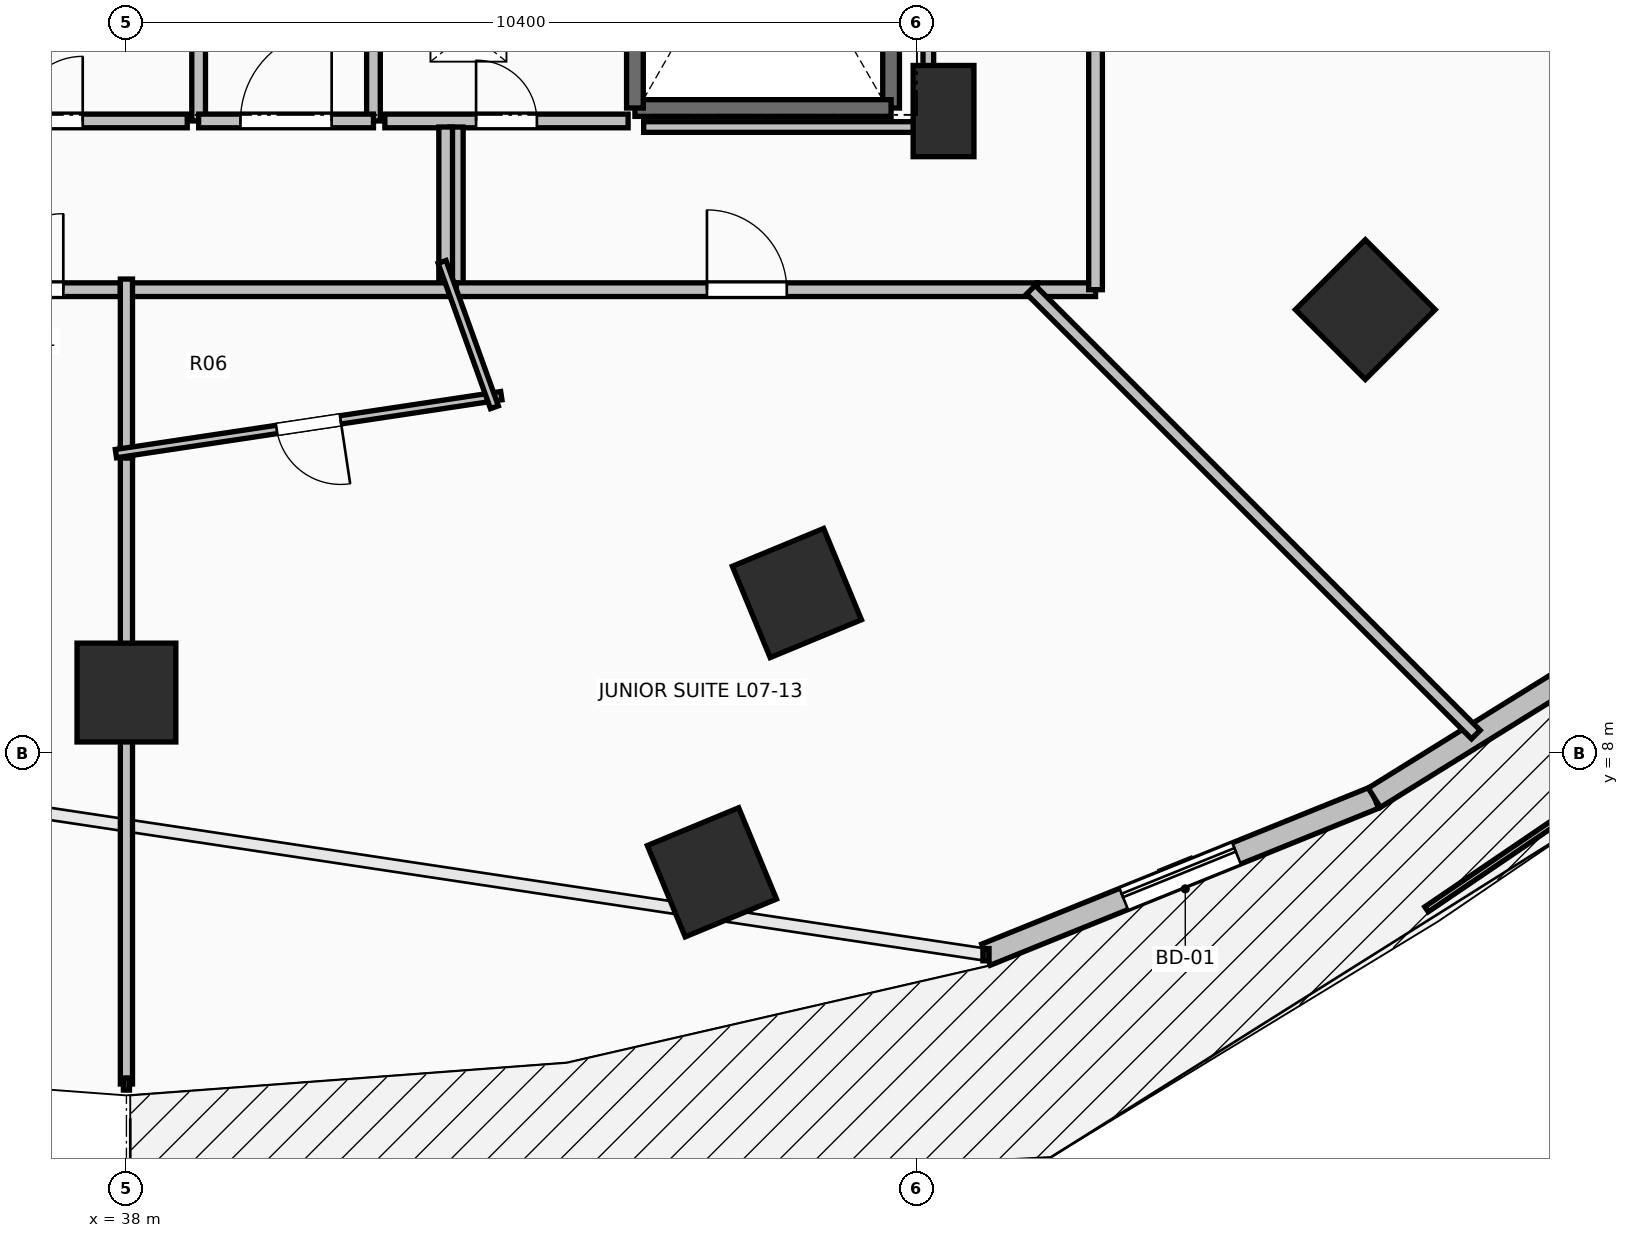
"""IFC4 building model, lengths in metres.
Left out: names, types, materials, properties, quantities, classifications, styles, units other than length and angle.
Written with IfcOpenShell. Run it as: python <this file> out.ifc"""

import sys

from ifc_helpers import new_model, si_unit, direction, frame, frame_2d, origin, origin_2d, place, context, subcontext, project, spatial, rectangle, extrude, element, fill, save


model = new_model("IFC4")
c1 = context("Model", 3, precision=1e-05, world=origin(), true_north=direction((0.0, 1.0)))
c2 = subcontext(c1, "Body", "Model", "MODEL_VIEW")
j1 = project(units=[si_unit("LENGTHUNIT", "METRE"), si_unit("PLANEANGLEUNIT", "RADIAN")], contexts=[c1])
p1 = place(None, origin())
s1 = spatial("IfcSite", under=j1, at=p1, CompositionType="ELEMENT")
p2 = place(p1, origin())
s2 = spatial("IfcBuilding", under=s1, at=p2, CompositionType="ELEMENT")
p3 = place(p2, frame((0.0, 0.0, 31.0)))
s3 = spatial("IfcBuildingStorey", under=s2, at=p3, CompositionType="ELEMENT", Elevation=31.0)
for number, where, z_axis, x_axis in (
    (1, (38.0, 8.8, 0.0), (0.0, 0.0, 1.0), (0.0, -1.0, 0.0)),
    (2, (46.821, 10.109, 0.0), (0.0, 0.0, 1.0), (0.383, -0.924, 0.0)),
    (3, (54.299, 13.838, 0.0), (0.0, 0.0, 1.0), (0.707, -0.707, 0.0)),
    (4, (45.703, 6.435, 0.0), (0.0, 0.0, 1.0), (0.383, -0.924, 0.0)),
):
    element("IfcColumn", number, at=place(p3, frame(where, z_axis=z_axis, x_axis=x_axis)), inside=s3, PredefinedType="COLUMN", context=c2, shape_type="SweptSolid", body=[
        extrude(rectangle(XDim=1.3, YDim=1.3, at=origin_2d()), origin(), (0.0, 0.0, 1.0), 3.5),
    ])
p4 = place(p3, frame((48.75, 16.45, 0.0), z_axis=(0.0, 0.0, 1.0), x_axis=(1.0, 0.0, 0.0)))
e5 = element("IfcColumn", 5, at=p4, inside=s3, PredefinedType="PILASTER", context=c2, shape_type="SweptSolid", body=[
    extrude(rectangle(XDim=0.8, YDim=1.2, at=origin_2d()), origin(), (0.0, 0.0, 1.0), 3.5),
])
p5 = place(p3, frame((49.308, 5.351, 0.0), z_axis=(0.0, 0.0, 1.0), x_axis=(0.927095325176, 0.374825636845, 0.0)))
e6 = element("IfcWall", 6, at=p5, inside=s3, PredefinedType="STANDARD", context=c2, shape_type="SweptSolid", body=[
    extrude(rectangle(XDim=5.51, YDim=0.3, at=frame_2d((2.755, 0.0))), origin(), (0.0, 0.0, 1.0), 3.24),
])
p6 = place(p5, frame((1.955, 0.0, 0.0)))
e7 = element("IfcOpeningElement", 7, at=p6, cuts=e6, PredefinedType="OPENING", context=c2, shape_type="SweptSolid", body=[
    extrude(rectangle(XDim=1.6, YDim=2.3, at=frame_2d((0.8, 1.15))), frame((0.0, 0.165, 0.0), z_axis=(0.0, -1.0, 0.0), x_axis=(1.0, 0.0, 0.0)), (0.0, 0.0, 1.0), 0.33),
])
p7 = place(p3, frame((54.417, 7.417, 0.0), z_axis=(0.0, 0.0, 1.0), x_axis=(0.849633724826, 0.527373239404, 0.0)))
e8 = element("IfcWall", 8, at=p7, inside=s3, PredefinedType="STANDARD", context=c2, shape_type="SweptSolid", body=[
    extrude(rectangle(XDim=5.271, YDim=0.3, at=frame_2d((2.635, 0.0))), origin(), (0.0, 0.0, 1.0), 3.24),
])
p8 = place(p3, frame((48.06, 23.91, 0.0), z_axis=(0.0, 0.0, 1.0), x_axis=(0.0, -1.0, 0.0)))
e9 = element("IfcWall", 9, at=p8, inside=s3, PredefinedType="SOLIDWALL", context=c2, shape_type="SweptSolid", body=[
    extrude(rectangle(XDim=7.42, YDim=0.22, at=frame_2d((3.71, 0.0))), origin(), (0.0, 0.0, 1.0), 3.24),
])
p9 = place(p3, frame((48.06, 16.49, 0.0), z_axis=(0.0, 0.0, 1.0), x_axis=(-1.0, 0.0, 0.0)))
e10 = element("IfcWall", 10, at=p9, inside=s3, PredefinedType="SOLIDWALL", context=c2, shape_type="SweptSolid", body=[
    extrude(rectangle(XDim=3.37, YDim=0.22, at=frame_2d((1.685, 0.0))), origin(), (0.0, 0.0, 1.0), 3.24),
])
p10 = place(p3, frame((44.69, 16.49, 0.0), z_axis=(0.0, 0.0, 1.0), x_axis=(0.0, 1.0, 0.0)))
e11 = element("IfcWall", 11, at=p10, inside=s3, PredefinedType="SOLIDWALL", context=c2, shape_type="SweptSolid", body=[
    extrude(rectangle(XDim=7.42, YDim=0.22, at=frame_2d((3.71, 0.0))), origin(), (0.0, 0.0, 1.0), 3.24),
])
p11 = place(p3, frame((41.25, 16.32, 0.0), z_axis=(0.0, 0.0, 1.0), x_axis=(0.0, 1.0, 0.0)))
e12 = element("IfcWall", 12, at=p11, inside=s3, PredefinedType="PARTITIONING", context=c2, shape_type="SweptSolid", body=[
    extrude(rectangle(XDim=7.88, YDim=0.18, at=frame_2d((3.94, 0.0))), origin(), (0.0, 0.0, 1.0), 3.24),
])
p12 = place(p11, frame((3.54, 0.0, 0.0)))
e13 = element("IfcOpeningElement", 13, at=p12, cuts=e12, PredefinedType="OPENING", context=c2, shape_type="SweptSolid", body=[
    extrude(rectangle(XDim=0.8, YDim=2.05, at=frame_2d((0.4, 1.025))), frame((0.0, 0.105, 0.0), z_axis=(0.0, -1.0, 0.0), x_axis=(1.0, 0.0, 0.0)), (0.0, 0.0, 1.0), 0.21),
])
p13 = place(p3, frame((38.95, 21.755, 0.0), z_axis=(0.0, 0.0, 1.0), x_axis=(0.0, -1.0, 0.0)))
e14 = element("IfcWall", 14, at=p13, inside=s3, PredefinedType="PARTITIONING", context=c2, shape_type="SweptSolid", body=[
    extrude(rectangle(XDim=5.435, YDim=0.18, at=frame_2d((2.717, 0.0))), origin(), (0.0, 0.0, 1.0), 3.24),
])
p14 = place(p13, frame((2.292, 0.0, 0.0)))
e15 = element("IfcOpeningElement", 15, at=p14, cuts=e14, PredefinedType="OPENING", context=c2, shape_type="SweptSolid", body=[
    extrude(rectangle(XDim=0.85, YDim=2.1, at=frame_2d((0.425, 1.05))), frame((0.0, 0.105, 0.0), z_axis=(0.0, -1.0, 0.0), x_axis=(1.0, 0.0, 0.0)), (0.0, 0.0, 1.0), 0.21),
])
p15 = place(p3, frame((38.95, 16.32, 0.0), z_axis=(0.0, 0.0, 1.0), x_axis=(1.0, 0.0, 0.0)))
e16 = element("IfcWall", 16, at=p15, inside=s3, PredefinedType="PARTITIONING", context=c2, shape_type="SweptSolid", body=[
    extrude(rectangle(XDim=2.3, YDim=0.18, at=frame_2d((1.15, 0.0))), origin(), (0.0, 0.0, 1.0), 3.24),
])
p16 = place(p15, frame((0.55, 0.0, 0.0)))
e17 = element("IfcOpeningElement", 17, at=p16, cuts=e16, PredefinedType="OPENING", context=c2, shape_type="SweptSolid", body=[
    extrude(rectangle(XDim=1.2, YDim=2.15, at=frame_2d((0.6, 1.075))), frame((0.0, 0.105, 0.0), z_axis=(0.0, -1.0, 0.0), x_axis=(1.0, 0.0, 0.0)), (0.0, 0.0, 1.0), 0.21),
])
p17 = place(p3, frame((41.4, 16.32, 0.0), z_axis=(0.0, 0.0, 1.0), x_axis=(1.0, 0.0, 0.0)))
e18 = element("IfcWall", 18, at=p17, inside=s3, PredefinedType="PARTITIONING", context=c2, shape_type="SweptSolid", body=[
    extrude(rectangle(XDim=3.2, YDim=0.18, at=frame_2d((1.6, 0.0))), origin(), (0.0, 0.0, 1.0), 3.24),
])
p18 = place(p17, frame((1.2, 0.0, 0.0)))
e19 = element("IfcOpeningElement", 19, at=p18, cuts=e18, PredefinedType="OPENING", context=c2, shape_type="SweptSolid", body=[
    extrude(rectangle(XDim=0.8, YDim=2.05, at=frame_2d((0.4, 1.025))), frame((0.0, 0.105, 0.0), z_axis=(0.0, -1.0, 0.0), x_axis=(1.0, 0.0, 0.0)), (0.0, 0.0, 1.0), 0.21),
])
p19 = place(p3, frame((35.2, 16.32, 0.0), z_axis=(0.0, 0.0, 1.0), x_axis=(1.0, 0.0, 0.0)))
e20 = element("IfcWall", 20, at=p19, inside=s3, PredefinedType="PARTITIONING", context=c2, shape_type="SweptSolid", body=[
    extrude(rectangle(XDim=3.6, YDim=0.18, at=frame_2d((1.8, 0.0))), origin(), (0.0, 0.0, 1.0), 3.24),
])
p20 = place(p19, frame((1.375, 0.0, 0.0)))
e21 = element("IfcOpeningElement", 21, at=p20, cuts=e20, PredefinedType="OPENING", context=c2, shape_type="SweptSolid", body=[
    extrude(rectangle(XDim=0.85, YDim=2.1, at=frame_2d((0.425, 1.05))), frame((0.0, 0.105, 0.0), z_axis=(0.0, -1.0, 0.0), x_axis=(1.0, 0.0, 0.0)), (0.0, 0.0, 1.0), 0.21),
])
p21 = place(p3, frame((35.279, 14.1, 0.0), z_axis=(0.0, 0.0, 1.0), x_axis=(1.0, 0.0, 0.0)))
e22 = element("IfcWall", 22, at=p21, inside=s3, PredefinedType="PARTITIONING", context=c2, shape_type="SweptSolid", body=[
    extrude(rectangle(XDim=2.781, YDim=0.18, at=frame_2d((1.391, 0.0))), origin(), (0.0, 0.0, 1.0), 3.24),
])
p22 = place(p21, frame((0.89, 0.0, 0.0)))
e23 = element("IfcOpeningElement", 23, at=p22, cuts=e22, PredefinedType="OPENING", context=c2, shape_type="SweptSolid", body=[
    extrude(rectangle(XDim=1.0, YDim=2.15, at=frame_2d((0.5, 1.075))), frame((0.0, 0.105, 0.0), z_axis=(0.0, -1.0, 0.0), x_axis=(1.0, 0.0, 0.0)), (0.0, 0.0, 1.0), 0.21),
])
p23 = place(p3, frame((42.34, 16.24, 0.0), z_axis=(0.0, 0.0, 1.0), x_axis=(0.0, -1.0, 0.0)))
e24 = element("IfcWall", 24, at=p23, inside=s3, PredefinedType="PARTITIONING", context=c2, shape_type="SweptSolid", body=[
    extrude(rectangle(XDim=2.14, YDim=0.18, at=frame_2d((1.07, 0.0))), origin(), (0.0, 0.0, 1.0), 3.24),
])
p24 = place(p3, frame((42.34, 14.1, 0.0), z_axis=(0.0, 0.0, 1.0), x_axis=(1.0, 0.0, 0.0)))
e25 = element("IfcWall", 25, at=p24, inside=s3, PredefinedType="PARTITIONING", context=c2, shape_type="SweptSolid", body=[
    extrude(rectangle(XDim=7.645, YDim=0.18, at=frame_2d((3.823, 0.0))), origin(), (0.0, 0.0, 1.0), 2.432),
])
p25 = place(p24, frame((3.298, 0.0, 0.0)))
e26 = element("IfcOpeningElement", 26, at=p25, cuts=e25, PredefinedType="OPENING", context=c2, shape_type="SweptSolid", body=[
    extrude(rectangle(XDim=1.05, YDim=2.2, at=frame_2d((0.525, 1.1))), frame((0.0, 0.105, 0.0), z_axis=(0.0, -1.0, 0.0), x_axis=(1.0, 0.0, 0.0)), (0.0, 0.0, 1.0), 0.21),
])
p26 = place(p3, frame((42.2, 14.157, 0.0), z_axis=(0.0, 0.0, 1.0), x_axis=(0.0, 1.0, 0.0)))
e27 = element("IfcWall", 27, at=p26, inside=s3, PredefinedType="PARTITIONING", context=c2, shape_type="SweptSolid", body=[
    extrude(rectangle(XDim=2.083, YDim=0.18, at=frame_2d((1.042, 0.0))), origin(), (0.0, 0.0, 1.0), 3.24),
])
p27 = place(p3, frame((37.92, 14.1, 0.0), z_axis=(0.0, 0.0, 1.0), x_axis=(1.0, 0.0, 0.0)))
e28 = element("IfcWall", 28, at=p27, inside=s3, PredefinedType="PARTITIONING", context=c2, shape_type="SweptSolid", body=[
    extrude(rectangle(XDim=4.42, YDim=0.18, at=frame_2d((2.21, 0.0))), origin(), (0.0, 0.0, 1.0), 3.24),
])
p28 = place(p3, frame((49.985, 14.1, 0.0), z_axis=(0.0, 0.0, 1.0), x_axis=(1.0, 0.0, 0.0)))
e29 = element("IfcWall", 29, at=p28, inside=s3, PredefinedType="PARTITIONING", context=c2, shape_type="SweptSolid", body=[
    extrude(rectangle(XDim=0.765, YDim=0.18, at=frame_2d((0.382, 0.0))), origin(), (0.0, 0.0, 1.0), 3.24),
])
p29 = place(p3, frame((50.75, 14.1, 0.0), z_axis=(0.0, 0.0, 1.0), x_axis=(0.0, 1.0, 0.0)))
e30 = element("IfcWall", 30, at=p29, inside=s3, PredefinedType="PARTITIONING", context=c2, shape_type="SweptSolid", body=[
    extrude(rectangle(XDim=11.7, YDim=0.18, at=frame_2d((5.85, 0.0))), origin(), (0.0, 0.0, 1.0), 2.432),
])
p30 = place(p29, frame((5.35, 0.0, 0.0)))
e31 = element("IfcOpeningElement", 31, at=p30, cuts=e30, PredefinedType="OPENING", context=c2, shape_type="SweptSolid", body=[
    extrude(rectangle(XDim=1.0, YDim=2.15, at=frame_2d((0.5, 1.075))), frame((0.0, 0.105, 0.0), z_axis=(0.0, -1.0, 0.0), x_axis=(1.0, 0.0, 0.0)), (0.0, 0.0, 1.0), 0.21),
])
p31 = place(p3, frame((38.0, 3.65, 0.0), z_axis=(0.0, 0.0, 1.0), x_axis=(0.0, 1.0, 0.0)))
e32 = element("IfcWall", 32, at=p31, inside=s3, PredefinedType="PARTITIONING", context=c2, shape_type="SweptSolid", body=[
    extrude(rectangle(XDim=8.375, YDim=0.16, at=frame_2d((4.188, 0.0))), origin(), (0.0, 0.0, 1.0), 2.432),
])
p32 = place(p3, frame((38.0, 11.885, 0.0), z_axis=(0.0, 0.0, 1.0), x_axis=(0.0, 1.0, 0.0)))
e33 = element("IfcWall", 33, at=p32, inside=s3, PredefinedType="PARTITIONING", context=c2, shape_type="SweptSolid", body=[
    extrude(rectangle(XDim=2.355, YDim=0.16, at=frame_2d((1.177, 0.0))), origin(), (0.0, 0.0, 1.0), 2.922),
])
p33 = place(p3, frame((42.932, 12.706, 0.0), z_axis=(0.0, 0.0, 1.0), x_axis=(-0.988876905643, -0.148736227888, 0.0)))
e34 = element("IfcWall", 34, at=p33, inside=s3, PredefinedType="PARTITIONING", context=c2, shape_type="SweptSolid", body=[
    extrude(rectangle(XDim=5.128, YDim=0.11, at=frame_2d((2.564, 0.0))), origin(), (0.0, 0.0, 1.0), 3.24),
])
p34 = place(p33, frame((2.139, 0.0, 0.0)))
e35 = element("IfcOpeningElement", 35, at=p34, cuts=e34, PredefinedType="OPENING", context=c2, shape_type="SweptSolid", body=[
    extrude(rectangle(XDim=0.85, YDim=2.1, at=frame_2d((0.425, 1.05))), frame((0.0, 0.07, 0.0), z_axis=(0.0, -1.0, 0.0), x_axis=(1.0, 0.0, 0.0)), (0.0, 0.0, 1.0), 0.14),
])
p35 = place(p3, frame((42.153, 14.466, 0.0), z_axis=(0.0, 0.0, 1.0), x_axis=(0.338800270412, -0.940858319179, 0.0)))
e36 = element("IfcWall", 36, at=p35, inside=s3, PredefinedType="PARTITIONING", context=c2, shape_type="SweptSolid", body=[
    extrude(rectangle(XDim=2.033, YDim=0.11, at=frame_2d((1.016, 0.0))), origin(), (0.0, 0.0, 1.0), 2.432),
])
p36 = place(p3, frame((55.753, 8.247, 0.0), z_axis=(0.0, 0.0, 1.0), x_axis=(-0.707106781187, 0.707106781187, 0.0)))
e37 = element("IfcWall", 37, at=p36, inside=s3, PredefinedType="PARTITIONING", context=c2, shape_type="SweptSolid", body=[
    extrude(rectangle(XDim=8.277, YDim=0.16, at=frame_2d((4.139, 0.0))), origin(), (0.0, 0.0, 1.0), 2.624),
])
p37 = place(p3, frame((48.55, 23.754, 0.0), z_axis=(0.0, 0.0, 1.0), x_axis=(0.0, -1.0, 0.0)))
e38 = element("IfcWall", 38, at=p37, inside=s3, PredefinedType="PARTITIONING", context=c2, shape_type="SweptSolid", body=[
    extrude(rectangle(XDim=7.514, YDim=0.14, at=frame_2d((3.757, 0.0))), origin(), (0.0, 0.0, 1.0), 2.432),
])
p38 = place(p3, frame((48.55, 16.24, 0.0), z_axis=(0.0, 0.0, 1.0), x_axis=(-1.0, 0.0, 0.0)))
e39 = element("IfcWall", 39, at=p38, inside=s3, PredefinedType="PARTITIONING", context=c2, shape_type="SweptSolid", body=[
    extrude(rectangle(XDim=3.745, YDim=0.14, at=frame_2d((1.873, 0.0))), origin(), (0.0, 0.0, 1.0), 2.432),
])
p39 = place(p6, origin())
e40 = element("IfcDoor", 40, at=p39, inside=s3, OperationType="SLIDING_TO_LEFT", PredefinedType="DOOR", context=c2, shape_type="SweptSolid", body=[
    extrude(rectangle(XDim=1.6, YDim=2.3, at=frame_2d((0.8, 1.15))), frame((0.0, 0.025, 0.0), z_axis=(0.0, -1.0, 0.0), x_axis=(1.0, 0.0, 0.0)), (0.0, 0.0, 1.0), 0.05),
])
fill(e7, e40)
p40 = place(p16, origin())
e41 = element("IfcDoor", 41, at=p40, inside=s3, OperationType="SINGLE_SWING_RIGHT", PredefinedType="DOOR", context=c2, shape_type="SweptSolid", body=[
    extrude(rectangle(XDim=1.2, YDim=2.15, at=frame_2d((0.6, 1.075))), frame((0.0, 0.025, 0.0), z_axis=(0.0, -1.0, 0.0), x_axis=(1.0, 0.0, 0.0)), (0.0, 0.0, 1.0), 0.05),
])
fill(e17, e41)
p41 = place(p18, origin())
e42 = element("IfcDoor", 42, at=p41, inside=s3, OperationType="SINGLE_SWING_LEFT", PredefinedType="DOOR", context=c2, shape_type="SweptSolid", body=[
    extrude(rectangle(XDim=0.8, YDim=2.05, at=frame_2d((0.4, 1.025))), frame((0.0, 0.025, 0.0), z_axis=(0.0, -1.0, 0.0), x_axis=(1.0, 0.0, 0.0)), (0.0, 0.0, 1.0), 0.05),
])
fill(e19, e42)
p42 = place(p20, origin())
e43 = element("IfcDoor", 43, at=p42, inside=s3, OperationType="SINGLE_SWING_RIGHT", PredefinedType="DOOR", context=c2, shape_type="SweptSolid", body=[
    extrude(rectangle(XDim=0.85, YDim=2.1, at=frame_2d((0.425, 1.05))), frame((0.0, 0.025, 0.0), z_axis=(0.0, -1.0, 0.0), x_axis=(1.0, 0.0, 0.0)), (0.0, 0.0, 1.0), 0.05),
])
fill(e21, e43)
p43 = place(p22, origin())
e44 = element("IfcDoor", 44, at=p43, inside=s3, OperationType="SINGLE_SWING_RIGHT", PredefinedType="DOOR", context=c2, shape_type="SweptSolid", body=[
    extrude(rectangle(XDim=1.0, YDim=2.15, at=frame_2d((0.5, 1.075))), frame((0.0, 0.025, 0.0), z_axis=(0.0, -1.0, 0.0), x_axis=(1.0, 0.0, 0.0)), (0.0, 0.0, 1.0), 0.05),
])
fill(e23, e44)
p44 = place(p25, origin())
e45 = element("IfcDoor", 45, at=p44, inside=s3, OperationType="SINGLE_SWING_LEFT", PredefinedType="DOOR", context=c2, shape_type="SweptSolid", body=[
    extrude(rectangle(XDim=1.05, YDim=2.2, at=frame_2d((0.525, 1.1))), frame((0.0, 0.025, 0.0), z_axis=(0.0, -1.0, 0.0), x_axis=(1.0, 0.0, 0.0)), (0.0, 0.0, 1.0), 0.05),
])
fill(e26, e45)
p45 = place(p34, origin())
e46 = element("IfcDoor", 46, at=p45, inside=s3, OperationType="SINGLE_SWING_LEFT", PredefinedType="DOOR", context=c2, shape_type="SweptSolid", body=[
    extrude(rectangle(XDim=0.85, YDim=2.1, at=frame_2d((0.425, 1.05))), frame((0.0, 0.025, 0.0), z_axis=(0.0, -1.0, 0.0), x_axis=(1.0, 0.0, 0.0)), (0.0, 0.0, 1.0), 0.05),
])
fill(e35, e46)
save(model, sys.argv[1])
